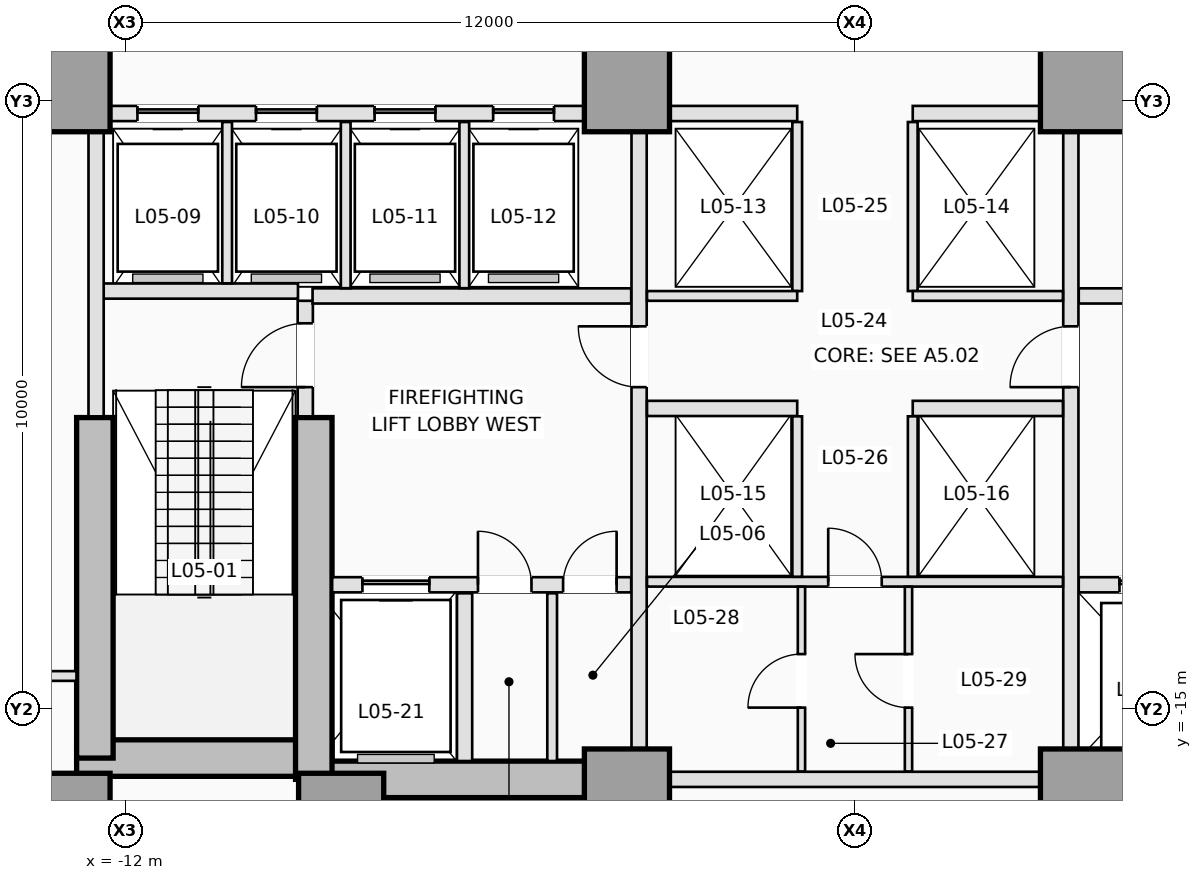
"""IFC4 building model, lengths in metres.
Left out: names, types, materials, properties, quantities, classifications, styles, units other than length and angle.
Written with IfcOpenShell. Run it as: python <this file> out.ifc"""

import sys

from ifc_helpers import new_model, si_unit, direction, frame, frame_2d, origin, origin_2d, place, context, subcontext, project, spatial, rectangle, extrude, element, fill, save


model = new_model("IFC4")
c1 = context("Model", 3, precision=1e-05, world=origin(), true_north=direction((0.0, 1.0)))
c2 = subcontext(c1, "Body", "Model", "MODEL_VIEW")
j1 = project(units=[si_unit("LENGTHUNIT", "METRE"), si_unit("PLANEANGLEUNIT", "RADIAN")], contexts=[c1])
p1 = place(None, origin())
s1 = spatial("IfcSite", under=j1, at=p1, CompositionType="ELEMENT")
p2 = place(p1, origin())
s2 = spatial("IfcBuilding", under=s1, at=p2, CompositionType="ELEMENT")
p3 = place(p2, frame((0.0, 0.0, 23.0)))
s3 = spatial("IfcBuildingStorey", under=s2, at=p3, CompositionType="ELEMENT", Elevation=23.0)
p4 = place(p3, frame((-12.8, -15.8, 0.0), z_axis=(0.0, 0.0, 1.0), x_axis=(1.0, 0.0, 0.0)))
e1 = element("IfcWall", 1, at=p4, inside=s3, PredefinedType="SHEAR", context=c2, shape_type="SweptSolid", body=[
    extrude(rectangle(XDim=4.2, YDim=0.6, at=frame_2d((2.1, 0.0))), origin(), (0.0, 0.0, 1.0), 4.6),
])
for number, where, z_axis, x_axis in (
    (2, (-8.9, -16.15, 0.0), (0.0, 0.0, 1.0), (1.0, 0.0, 0.0)),
    (3, (3.75, -16.15, 0.0), (0.0, 0.0, 1.0), (1.0, 0.0, 0.0)),
):
    element("IfcWall", number, at=place(p3, frame(where, z_axis=z_axis, x_axis=x_axis)), inside=s3, PredefinedType="SHEAR", context=c2, shape_type="SweptSolid", body=[
        extrude(rectangle(XDim=5.15, YDim=0.6, at=frame_2d((2.575, 0.0))), origin(), (0.0, 0.0, 1.0), 4.6),
    ])
p5 = place(p3, frame((-12.5, -15.8, 0.0), z_axis=(0.0, 0.0, 1.0), x_axis=(0.0, 1.0, 0.0)))
e4 = element("IfcWall", 4, at=p5, inside=s3, PredefinedType="SHEAR", context=c2, shape_type="SweptSolid", body=[
    extrude(rectangle(XDim=5.6, YDim=0.6, at=frame_2d((2.8, 0.0))), origin(), (0.0, 0.0, 1.0), 4.6),
])
p6 = place(p3, frame((-8.9, -16.15, 0.0), z_axis=(0.0, 0.0, 1.0), x_axis=(0.0, 1.0, 0.0)))
e5 = element("IfcWall", 5, at=p6, inside=s3, PredefinedType="SHEAR", context=c2, shape_type="SweptSolid", body=[
    extrude(rectangle(XDim=5.95, YDim=0.6, at=frame_2d((2.975, 0.0))), origin(), (0.0, 0.0, 1.0), 4.6),
])
for number, where, z_axis, x_axis in (
    (6, (-12.95, -16.75, 0.0), (0.0, 0.0, 1.0), (1.0, 0.0, 0.0)),
    (7, (-8.45, -16.75, 0.0), (0.0, 0.0, 1.0), (1.0, 0.0, 0.0)),
    (8, (-3.75, -16.35, 0.0), (0.0, 0.0, 1.0), (1.0, 0.0, 0.0)),
    (9, (3.75, -16.35, 0.0), (0.0, 0.0, 1.0), (1.0, 0.0, 0.0)),
    (10, (-12.95, -4.8, 0.0), (0.0, 0.0, 1.0), (1.0, 0.0, 0.0)),
    (11, (-3.75, -4.8, 0.0), (0.0, 0.0, 1.0), (1.0, 0.0, 0.0)),
    (12, (3.75, -4.8, 0.0), (0.0, 0.0, 1.0), (1.0, 0.0, 0.0)),
):
    element("IfcColumn", number, at=place(p3, frame(where, z_axis=z_axis, x_axis=x_axis)), inside=s3, PredefinedType="COLUMN", context=c2, shape_type="SweptSolid", body=[
        extrude(rectangle(XDim=1.4, YDim=1.4, at=origin_2d()), origin(), (0.0, 0.0, 1.0), 4.6),
    ])
p7 = place(p3, frame((-9.04, -10.18, 0.0), z_axis=(0.0, 0.0, 1.0), x_axis=(0.0, 1.0, 0.0)))
e13 = element("IfcWall", 13, at=p7, inside=s3, PredefinedType="PARTITIONING", context=c2, shape_type="SweptSolid", body=[
    extrude(rectangle(XDim=1.9, YDim=0.25, at=frame_2d((0.95, 0.0))), origin(), (0.0, 0.0, 1.0), 4.35),
])
p8 = place(p7, frame((0.48, 0.0, 0.0)))
e14 = element("IfcOpeningElement", 14, at=p8, cuts=e13, PredefinedType="OPENING", context=c2, shape_type="SweptSolid", body=[
    extrude(rectangle(XDim=1.05, YDim=2.15, at=frame_2d((0.525, 1.075))), frame((0.0, 0.135, 0.0), z_axis=(0.0, -1.0, 0.0), x_axis=(1.0, 0.0, 0.0)), (0.0, 0.0, 1.0), 0.27),
])
p9 = place(p3, frame((-12.38, -8.12, 0.0), z_axis=(0.0, 0.0, 1.0), x_axis=(1.0, 0.0, 0.0)))
e15 = element("IfcWall", 15, at=p9, inside=s3, PredefinedType="PARTITIONING", context=c2, shape_type="SweptSolid", body=[
    extrude(rectangle(XDim=3.22, YDim=0.25, at=frame_2d((1.61, 0.0))), origin(), (0.0, 0.0, 1.0), 4.35),
])
p10 = place(p3, frame((-12.48, -10.18, 0.0), z_axis=(0.0, 0.0, 1.0), x_axis=(0.0, 1.0, 0.0)))
e16 = element("IfcWall", 16, at=p10, inside=s3, PredefinedType="PARTITIONING", context=c2, shape_type="SweptSolid", body=[
    extrude(rectangle(XDim=4.678, YDim=0.25, at=frame_2d((2.339, 0.0))), origin(), (0.0, 0.0, 1.0), 4.35),
])
p11 = place(p3, frame((-8.598, -12.95, 0.0), z_axis=(0.0, 0.0, 1.0), x_axis=(1.0, 0.0, 0.0)))
e17 = element("IfcWall", 17, at=p11, inside=s3, PredefinedType="PARTITIONING", context=c2, shape_type="SweptSolid", body=[
    extrude(rectangle(XDim=4.918, YDim=0.25, at=frame_2d((2.459, 0.0))), origin(), (0.0, 0.0, 1.0), 4.35),
])
p12 = place(p11, frame((0.498, 0.0, 0.0)))
e18 = element("IfcOpeningElement", 18, at=p12, cuts=e17, PredefinedType="OPENING", context=c2, shape_type="SweptSolid", body=[
    extrude(rectangle(XDim=1.1, YDim=2.15, at=frame_2d((0.55, 1.075))), frame((0.0, 0.135, 0.0), z_axis=(0.0, -1.0, 0.0), x_axis=(1.0, 0.0, 0.0)), (0.0, 0.0, 1.0), 0.27),
])
p13 = place(p11, frame((2.398, 0.0, 0.0)))
e19 = element("IfcOpeningElement", 19, at=p13, cuts=e17, PredefinedType="OPENING", context=c2, shape_type="SweptSolid", body=[
    extrude(rectangle(XDim=0.88, YDim=2.1, at=frame_2d((0.44, 1.05))), frame((0.0, 0.135, 0.0), z_axis=(0.0, -1.0, 0.0), x_axis=(1.0, 0.0, 0.0)), (0.0, 0.0, 1.0), 0.27),
])
p14 = place(p11, frame((3.798, 0.0, 0.0)))
e20 = element("IfcOpeningElement", 20, at=p14, cuts=e17, PredefinedType="OPENING", context=c2, shape_type="SweptSolid", body=[
    extrude(rectangle(XDim=0.88, YDim=2.1, at=frame_2d((0.44, 1.05))), frame((0.0, 0.135, 0.0), z_axis=(0.0, -1.0, 0.0), x_axis=(1.0, 0.0, 0.0)), (0.0, 0.0, 1.0), 0.27),
])
p15 = place(p3, frame((3.68, -12.95, 0.0), z_axis=(0.0, 0.0, 1.0), x_axis=(1.0, 0.0, 0.0)))
e21 = element("IfcWall", 21, at=p15, inside=s3, PredefinedType="PARTITIONING", context=c2, shape_type="SweptSolid", body=[
    extrude(rectangle(XDim=4.918, YDim=0.25, at=frame_2d((2.459, 0.0))), origin(), (0.0, 0.0, 1.0), 4.35),
])
p16 = place(p15, frame((3.32, 0.0, 0.0)))
e22 = element("IfcOpeningElement", 22, at=p16, cuts=e21, PredefinedType="OPENING", context=c2, shape_type="SweptSolid", body=[
    extrude(rectangle(XDim=1.1, YDim=2.15, at=frame_2d((0.55, 1.075))), frame((0.0, 0.135, 0.0), z_axis=(0.0, -1.0, 0.0), x_axis=(1.0, 0.0, 0.0)), (0.0, 0.0, 1.0), 0.27),
])
p17 = place(p15, frame((0.67, 0.0, 0.0)))
e23 = element("IfcOpeningElement", 23, at=p17, cuts=e21, PredefinedType="OPENING", context=c2, shape_type="SweptSolid", body=[
    extrude(rectangle(XDim=1.2, YDim=2.15, at=frame_2d((0.6, 1.075))), frame((0.0, 0.135, 0.0), z_axis=(0.0, -1.0, 0.0), x_axis=(1.0, 0.0, 0.0)), (0.0, 0.0, 1.0), 0.27),
])
p18 = place(p3, frame((-6.42, -15.848, 0.0), z_axis=(0.0, 0.0, 1.0), x_axis=(0.0, 1.0, 0.0)))
e24 = element("IfcWall", 24, at=p18, inside=s3, PredefinedType="PARTITIONING", context=c2, shape_type="SweptSolid", body=[
    extrude(rectangle(XDim=2.758, YDim=0.25, at=frame_2d((1.379, 0.0))), origin(), (0.0, 0.0, 1.0), 4.35),
])
p19 = place(p3, frame((-4.98, -15.848, 0.0), z_axis=(0.0, 0.0, 1.0), x_axis=(0.0, 1.0, 0.0)))
e25 = element("IfcWall", 25, at=p19, inside=s3, PredefinedType="PARTITIONING", context=c2, shape_type="SweptSolid", body=[
    extrude(rectangle(XDim=2.758, YDim=0.16, at=frame_2d((1.379, 0.0))), origin(), (0.0, 0.0, 1.0), 4.35),
])
for number, where, z_axis, x_axis in (
    (26, (-8.92, -8.2, 0.0), (0.0, 0.0, 1.0), (1.0, 0.0, 0.0)),
    (27, (3.68, -8.2, 0.0), (0.0, 0.0, 1.0), (1.0, 0.0, 0.0)),
):
    element("IfcWall", number, at=place(p3, frame(where, z_axis=z_axis, x_axis=x_axis)), inside=s3, PredefinedType="PARTITIONING", context=c2, shape_type="SweptSolid", body=[
        extrude(rectangle(XDim=5.24, YDim=0.25, at=frame_2d((2.62, 0.0))), origin(), (0.0, 0.0, 1.0), 4.35),
    ])
p20 = place(p3, frame((-3.55, -15.648, 0.0), z_axis=(0.0, 0.0, 1.0), x_axis=(0.0, 1.0, 0.0)))
e28 = element("IfcWall", 28, at=p20, inside=s3, PredefinedType="PARTITIONING", context=c2, shape_type="SweptSolid", body=[
    extrude(rectangle(XDim=10.146, YDim=0.25, at=frame_2d((5.073, 0.0))), origin(), (0.0, 0.0, 1.0), 4.35),
])
p21 = place(p20, frame((5.948, 0.0, 0.0)))
e29 = element("IfcOpeningElement", 29, at=p21, cuts=e28, PredefinedType="OPENING", context=c2, shape_type="SweptSolid", body=[
    extrude(rectangle(XDim=1.0, YDim=2.15, at=frame_2d((0.5, 1.075))), frame((0.0, 0.135, 0.0), z_axis=(0.0, -1.0, 0.0), x_axis=(1.0, 0.0, 0.0)), (0.0, 0.0, 1.0), 0.27),
])
p22 = place(p3, frame((3.55, -15.648, 0.0), z_axis=(0.0, 0.0, 1.0), x_axis=(0.0, 1.0, 0.0)))
e30 = element("IfcWall", 30, at=p22, inside=s3, PredefinedType="PARTITIONING", context=c2, shape_type="SweptSolid", body=[
    extrude(rectangle(XDim=10.146, YDim=0.25, at=frame_2d((5.073, 0.0))), origin(), (0.0, 0.0, 1.0), 4.35),
])
p23 = place(p22, frame((5.948, 0.0, 0.0)))
e31 = element("IfcOpeningElement", 31, at=p23, cuts=e30, PredefinedType="OPENING", context=c2, shape_type="SweptSolid", body=[
    extrude(rectangle(XDim=1.0, YDim=2.15, at=frame_2d((0.5, 1.075))), frame((0.0, 0.135, 0.0), z_axis=(0.0, -1.0, 0.0), x_axis=(1.0, 0.0, 0.0)), (0.0, 0.0, 1.0), 0.27),
])
p24 = place(p3, frame((-12.248, -5.2, 0.0), z_axis=(0.0, 0.0, 1.0), x_axis=(1.0, 0.0, 0.0)))
e32 = element("IfcWall", 32, at=p24, inside=s3, PredefinedType="PARTITIONING", context=c2, shape_type="SweptSolid", body=[
    extrude(rectangle(XDim=7.796, YDim=0.25, at=frame_2d((3.898, 0.0))), origin(), (0.0, 0.0, 1.0), 2.55),
])
p25 = place(p24, frame((0.448, 0.0, 0.0)))
e33 = element("IfcOpeningElement", 33, at=p25, cuts=e32, PredefinedType="OPENING", context=c2, shape_type="SweptSolid", body=[
    extrude(rectangle(XDim=1.0, YDim=2.15, at=frame_2d((0.5, 1.075))), frame((0.0, 0.135, 0.0), z_axis=(0.0, -1.0, 0.0), x_axis=(1.0, 0.0, 0.0)), (0.0, 0.0, 1.0), 0.27),
])
p26 = place(p24, frame((2.398, 0.0, 0.0)))
e34 = element("IfcOpeningElement", 34, at=p26, cuts=e32, PredefinedType="OPENING", context=c2, shape_type="SweptSolid", body=[
    extrude(rectangle(XDim=1.0, YDim=2.15, at=frame_2d((0.5, 1.075))), frame((0.0, 0.135, 0.0), z_axis=(0.0, -1.0, 0.0), x_axis=(1.0, 0.0, 0.0)), (0.0, 0.0, 1.0), 0.27),
])
p27 = place(p24, frame((4.348, 0.0, 0.0)))
e35 = element("IfcOpeningElement", 35, at=p27, cuts=e32, PredefinedType="OPENING", context=c2, shape_type="SweptSolid", body=[
    extrude(rectangle(XDim=1.0, YDim=2.15, at=frame_2d((0.5, 1.075))), frame((0.0, 0.135, 0.0), z_axis=(0.0, -1.0, 0.0), x_axis=(1.0, 0.0, 0.0)), (0.0, 0.0, 1.0), 0.27),
])
p28 = place(p24, frame((6.298, 0.0, 0.0)))
e36 = element("IfcOpeningElement", 36, at=p28, cuts=e32, PredefinedType="OPENING", context=c2, shape_type="SweptSolid", body=[
    extrude(rectangle(XDim=1.0, YDim=2.15, at=frame_2d((0.5, 1.075))), frame((0.0, 0.135, 0.0), z_axis=(0.0, -1.0, 0.0), x_axis=(1.0, 0.0, 0.0)), (0.0, 0.0, 1.0), 0.27),
])
for number, where, z_axis, x_axis in (
    (37, (-3.048, -5.2, 0.0), (0.0, 0.0, 1.0), (1.0, 0.0, 0.0)),
    (38, (0.95, -5.2, 0.0), (0.0, 0.0, 1.0), (1.0, 0.0, 0.0)),
):
    element("IfcWall", number, at=place(p3, frame(where, z_axis=z_axis, x_axis=x_axis)), inside=s3, PredefinedType="PARTITIONING", context=c2, shape_type="SweptSolid", body=[
        extrude(rectangle(XDim=2.098, YDim=0.25, at=frame_2d((1.049, 0.0))), origin(), (0.0, 0.0, 1.0), 2.55),
    ])
p29 = place(p3, frame((-10.325, -7.993, 0.0), z_axis=(0.0, 0.0, 1.0), x_axis=(0.0, 1.0, 0.0)))
e39 = element("IfcWall", 39, at=p29, inside=s3, PredefinedType="PARTITIONING", context=c2, shape_type="SweptSolid", body=[
    extrude(rectangle(XDim=2.653, YDim=0.16, at=frame_2d((1.326, 0.0))), origin(), (0.0, 0.0, 1.0), 4.35),
])
for number, where, z_axis, x_axis in (
    (40, (-8.375, -8.073, 0.0), (0.0, 0.0, 1.0), (0.0, 1.0, 0.0)),
    (41, (-6.425, -8.073, 0.0), (0.0, 0.0, 1.0), (0.0, 1.0, 0.0)),
):
    element("IfcWall", number, at=place(p3, frame(where, z_axis=z_axis, x_axis=x_axis)), inside=s3, PredefinedType="PARTITIONING", context=c2, shape_type="SweptSolid", body=[
        extrude(rectangle(XDim=2.733, YDim=0.16, at=frame_2d((1.366, 0.0))), origin(), (0.0, 0.0, 1.0), 4.35),
    ])
p30 = place(p3, frame((-3.048, -16.15, 0.0), z_axis=(0.0, 0.0, 1.0), x_axis=(1.0, 0.0, 0.0)))
e42 = element("IfcWall", 42, at=p30, inside=s3, PredefinedType="PARTITIONING", context=c2, shape_type="SweptSolid", body=[
    extrude(rectangle(XDim=6.096, YDim=0.25, at=frame_2d((3.048, 0.0))), origin(), (0.0, 0.0, 1.0), 2.55),
])
for number, where, z_axis, x_axis in (
    (43, (-0.95, -8.12, 0.0), (0.0, 0.0, 1.0), (0.0, 1.0, 0.0)),
    (44, (0.95, -8.12, 0.0), (0.0, 0.0, 1.0), (0.0, 1.0, 0.0)),
):
    element("IfcWall", number, at=place(p3, frame(where, z_axis=z_axis, x_axis=x_axis)), inside=s3, PredefinedType="PARTITIONING", context=c2, shape_type="SweptSolid", body=[
        extrude(rectangle(XDim=2.78, YDim=0.16, at=frame_2d((1.39, 0.0))), origin(), (0.0, 0.0, 1.0), 4.35),
    ])
for number, where, z_axis, x_axis in (
    (45, (-3.42, -8.2, 0.0), (0.0, 0.0, 1.0), (1.0, 0.0, 0.0)),
    (46, (0.95, -8.2, 0.0), (0.0, 0.0, 1.0), (1.0, 0.0, 0.0)),
):
    element("IfcWall", number, at=place(p3, frame(where, z_axis=z_axis, x_axis=x_axis)), inside=s3, PredefinedType="PARTITIONING", context=c2, shape_type="SweptSolid", body=[
        extrude(rectangle(XDim=2.47, YDim=0.16, at=frame_2d((1.235, 0.0))), origin(), (0.0, 0.0, 1.0), 4.35),
    ])
for number, where, z_axis, x_axis in (
    (47, (-3.42, -10.05, 0.0), (0.0, 0.0, 1.0), (1.0, 0.0, 0.0)),
    (48, (0.95, -10.05, 0.0), (0.0, 0.0, 1.0), (1.0, 0.0, 0.0)),
):
    element("IfcWall", number, at=place(p3, frame(where, z_axis=z_axis, x_axis=x_axis)), inside=s3, PredefinedType="PARTITIONING", context=c2, shape_type="SweptSolid", body=[
        extrude(rectangle(XDim=2.47, YDim=0.25, at=frame_2d((1.235, 0.0))), origin(), (0.0, 0.0, 1.0), 4.35),
    ])
p31 = place(p3, frame((-3.42, -12.9, 0.0), z_axis=(0.0, 0.0, 1.0), x_axis=(1.0, 0.0, 0.0)))
e49 = element("IfcWall", 49, at=p31, inside=s3, PredefinedType="PARTITIONING", context=c2, shape_type="SweptSolid", body=[
    extrude(rectangle(XDim=6.84, YDim=0.16, at=frame_2d((3.42, 0.0))), origin(), (0.0, 0.0, 1.0), 4.35),
])
p32 = place(p31, frame((2.98, 0.0, 0.0)))
e50 = element("IfcOpeningElement", 50, at=p32, cuts=e49, PredefinedType="OPENING", context=c2, shape_type="SweptSolid", body=[
    extrude(rectangle(XDim=0.88, YDim=2.12, at=frame_2d((0.44, 1.06))), frame((0.0, 0.09, 0.0), z_axis=(0.0, -1.0, 0.0), x_axis=(1.0, 0.0, 0.0)), (0.0, 0.0, 1.0), 0.18),
])
for number, where, z_axis, x_axis in (
    (51, (-0.95, -12.818, 0.0), (0.0, 0.0, 1.0), (0.0, 1.0, 0.0)),
    (52, (0.95, -12.818, 0.0), (0.0, 0.0, 1.0), (0.0, 1.0, 0.0)),
):
    element("IfcWall", number, at=place(p3, frame(where, z_axis=z_axis, x_axis=x_axis)), inside=s3, PredefinedType="PARTITIONING", context=c2, shape_type="SweptSolid", body=[
        extrude(rectangle(XDim=2.638, YDim=0.16, at=frame_2d((1.319, 0.0))), origin(), (0.0, 0.0, 1.0), 4.35),
    ])
p33 = place(p3, frame((-0.88, -16.02, 0.0), z_axis=(0.0, 0.0, 1.0), x_axis=(0.0, 1.0, 0.0)))
e53 = element("IfcWall", 53, at=p33, inside=s3, PredefinedType="PARTITIONING", context=c2, shape_type="SweptSolid", body=[
    extrude(rectangle(XDim=3.038, YDim=0.12, at=frame_2d((1.519, 0.0))), origin(), (0.0, 0.0, 1.0), 4.35),
])
p34 = place(p33, frame((1.05, 0.0, 0.0)))
e54 = element("IfcOpeningElement", 54, at=p34, cuts=e53, PredefinedType="OPENING", context=c2, shape_type="SweptSolid", body=[
    extrude(rectangle(XDim=0.88, YDim=2.12, at=frame_2d((0.44, 1.06))), frame((0.0, 0.07, 0.0), z_axis=(0.0, -1.0, 0.0), x_axis=(1.0, 0.0, 0.0)), (0.0, 0.0, 1.0), 0.14),
])
p35 = place(p3, frame((0.88, -16.02, 0.0), z_axis=(0.0, 0.0, 1.0), x_axis=(0.0, 1.0, 0.0)))
e55 = element("IfcWall", 55, at=p35, inside=s3, PredefinedType="PARTITIONING", context=c2, shape_type="SweptSolid", body=[
    extrude(rectangle(XDim=3.038, YDim=0.12, at=frame_2d((1.519, 0.0))), origin(), (0.0, 0.0, 1.0), 4.35),
])
p36 = place(p35, frame((1.05, 0.0, 0.0)))
e56 = element("IfcOpeningElement", 56, at=p36, cuts=e55, PredefinedType="OPENING", context=c2, shape_type="SweptSolid", body=[
    extrude(rectangle(XDim=0.88, YDim=2.12, at=frame_2d((0.44, 1.06))), frame((0.0, 0.07, 0.0), z_axis=(0.0, -1.0, 0.0), x_axis=(1.0, 0.0, 0.0)), (0.0, 0.0, 1.0), 0.14),
])
p37 = place(p3, frame((-21.768, -14.45, 0.0), z_axis=(0.0, 0.0, 1.0), x_axis=(1.0, 0.0, 0.0)))
e57 = element("IfcWall", 57, at=p37, inside=s3, PredefinedType="PARTITIONING", context=c2, shape_type="SweptSolid", body=[
    extrude(rectangle(XDim=8.966, YDim=0.16, at=frame_2d((4.483, 0.0))), origin(), (0.0, 0.0, 1.0), 4.35),
])
p38 = place(p25, origin())
e58 = element("IfcDoor", 58, at=p38, inside=s3, OperationType="SLIDING_TO_LEFT", PredefinedType="DOOR", context=c2, shape_type="SweptSolid", body=[
    extrude(rectangle(XDim=1.0, YDim=2.15, at=frame_2d((0.5, 1.075))), frame((0.0, 0.025, 0.0), z_axis=(0.0, -1.0, 0.0), x_axis=(1.0, 0.0, 0.0)), (0.0, 0.0, 1.0), 0.05),
])
fill(e33, e58)
p39 = place(p26, origin())
e59 = element("IfcDoor", 59, at=p39, inside=s3, OperationType="SLIDING_TO_LEFT", PredefinedType="DOOR", context=c2, shape_type="SweptSolid", body=[
    extrude(rectangle(XDim=1.0, YDim=2.15, at=frame_2d((0.5, 1.075))), frame((0.0, 0.025, 0.0), z_axis=(0.0, -1.0, 0.0), x_axis=(1.0, 0.0, 0.0)), (0.0, 0.0, 1.0), 0.05),
])
fill(e34, e59)
p40 = place(p27, origin())
e60 = element("IfcDoor", 60, at=p40, inside=s3, OperationType="SLIDING_TO_LEFT", PredefinedType="DOOR", context=c2, shape_type="SweptSolid", body=[
    extrude(rectangle(XDim=1.0, YDim=2.15, at=frame_2d((0.5, 1.075))), frame((0.0, 0.025, 0.0), z_axis=(0.0, -1.0, 0.0), x_axis=(1.0, 0.0, 0.0)), (0.0, 0.0, 1.0), 0.05),
])
fill(e35, e60)
p41 = place(p28, origin())
e61 = element("IfcDoor", 61, at=p41, inside=s3, OperationType="SLIDING_TO_LEFT", PredefinedType="DOOR", context=c2, shape_type="SweptSolid", body=[
    extrude(rectangle(XDim=1.0, YDim=2.15, at=frame_2d((0.5, 1.075))), frame((0.0, 0.025, 0.0), z_axis=(0.0, -1.0, 0.0), x_axis=(1.0, 0.0, 0.0)), (0.0, 0.0, 1.0), 0.05),
])
fill(e36, e61)
p42 = place(p12, origin())
e62 = element("IfcDoor", 62, at=p42, inside=s3, OperationType="SLIDING_TO_LEFT", PredefinedType="DOOR", context=c2, shape_type="SweptSolid", body=[
    extrude(rectangle(XDim=1.1, YDim=2.15, at=frame_2d((0.55, 1.075))), frame((0.0, 0.025, 0.0), z_axis=(0.0, -1.0, 0.0), x_axis=(1.0, 0.0, 0.0)), (0.0, 0.0, 1.0), 0.05),
])
fill(e18, e62)
p43 = place(p17, origin())
e63 = element("IfcDoor", 63, at=p43, inside=s3, OperationType="SLIDING_TO_LEFT", PredefinedType="DOOR", context=c2, shape_type="SweptSolid", body=[
    extrude(rectangle(XDim=1.2, YDim=2.15, at=frame_2d((0.6, 1.075))), frame((0.0, 0.025, 0.0), z_axis=(0.0, -1.0, 0.0), x_axis=(1.0, 0.0, 0.0)), (0.0, 0.0, 1.0), 0.05),
])
fill(e23, e63)
p44 = place(p8, origin())
e64 = element("IfcDoor", 64, at=p44, inside=s3, OperationType="SINGLE_SWING_LEFT", PredefinedType="DOOR", context=c2, shape_type="SweptSolid", body=[
    extrude(rectangle(XDim=1.05, YDim=2.15, at=frame_2d((0.525, 1.075))), frame((0.0, 0.025, 0.0), z_axis=(0.0, -1.0, 0.0), x_axis=(1.0, 0.0, 0.0)), (0.0, 0.0, 1.0), 0.05),
])
fill(e14, e64)
p45 = place(p13, origin())
e65 = element("IfcDoor", 65, at=p45, inside=s3, OperationType="SINGLE_SWING_LEFT", PredefinedType="TRAPDOOR", context=c2, shape_type="SweptSolid", body=[
    extrude(rectangle(XDim=0.88, YDim=2.1, at=frame_2d((0.44, 1.05))), frame((0.0, 0.025, 0.0), z_axis=(0.0, -1.0, 0.0), x_axis=(1.0, 0.0, 0.0)), (0.0, 0.0, 1.0), 0.05),
])
fill(e19, e65)
p46 = place(p14, origin())
e66 = element("IfcDoor", 66, at=p46, inside=s3, OperationType="SINGLE_SWING_RIGHT", PredefinedType="TRAPDOOR", context=c2, shape_type="SweptSolid", body=[
    extrude(rectangle(XDim=0.88, YDim=2.1, at=frame_2d((0.44, 1.05))), frame((0.0, 0.025, 0.0), z_axis=(0.0, -1.0, 0.0), x_axis=(1.0, 0.0, 0.0)), (0.0, 0.0, 1.0), 0.05),
])
fill(e20, e66)
p47 = place(p21, origin())
e67 = element("IfcDoor", 67, at=p47, inside=s3, OperationType="SINGLE_SWING_RIGHT", PredefinedType="DOOR", context=c2, shape_type="SweptSolid", body=[
    extrude(rectangle(XDim=1.0, YDim=2.15, at=frame_2d((0.5, 1.075))), frame((0.0, 0.025, 0.0), z_axis=(0.0, -1.0, 0.0), x_axis=(1.0, 0.0, 0.0)), (0.0, 0.0, 1.0), 0.05),
])
fill(e29, e67)
p48 = place(p23, origin())
e68 = element("IfcDoor", 68, at=p48, inside=s3, OperationType="SINGLE_SWING_LEFT", PredefinedType="DOOR", context=c2, shape_type="SweptSolid", body=[
    extrude(rectangle(XDim=1.0, YDim=2.15, at=frame_2d((0.5, 1.075))), frame((0.0, 0.025, 0.0), z_axis=(0.0, -1.0, 0.0), x_axis=(1.0, 0.0, 0.0)), (0.0, 0.0, 1.0), 0.05),
])
fill(e31, e68)
p49 = place(p32, origin())
e69 = element("IfcDoor", 69, at=p49, inside=s3, OperationType="SINGLE_SWING_LEFT", PredefinedType="DOOR", context=c2, shape_type="SweptSolid", body=[
    extrude(rectangle(XDim=0.88, YDim=2.12, at=frame_2d((0.44, 1.06))), frame((0.0, 0.025, 0.0), z_axis=(0.0, -1.0, 0.0), x_axis=(1.0, 0.0, 0.0)), (0.0, 0.0, 1.0), 0.05),
])
fill(e50, e69)
p50 = place(p34, origin())
e70 = element("IfcDoor", 70, at=p50, inside=s3, OperationType="SINGLE_SWING_LEFT", PredefinedType="DOOR", context=c2, shape_type="SweptSolid", body=[
    extrude(rectangle(XDim=0.88, YDim=2.12, at=frame_2d((0.44, 1.06))), frame((0.0, 0.025, 0.0), z_axis=(0.0, -1.0, 0.0), x_axis=(1.0, 0.0, 0.0)), (0.0, 0.0, 1.0), 0.05),
])
fill(e54, e70)
p51 = place(p36, origin())
e71 = element("IfcDoor", 71, at=p51, inside=s3, OperationType="SINGLE_SWING_RIGHT", PredefinedType="DOOR", context=c2, shape_type="SweptSolid", body=[
    extrude(rectangle(XDim=0.88, YDim=2.12, at=frame_2d((0.44, 1.06))), frame((0.0, 0.025, 0.0), z_axis=(0.0, -1.0, 0.0), x_axis=(1.0, 0.0, 0.0)), (0.0, 0.0, 1.0), 0.05),
])
fill(e56, e71)
save(model, sys.argv[1])
